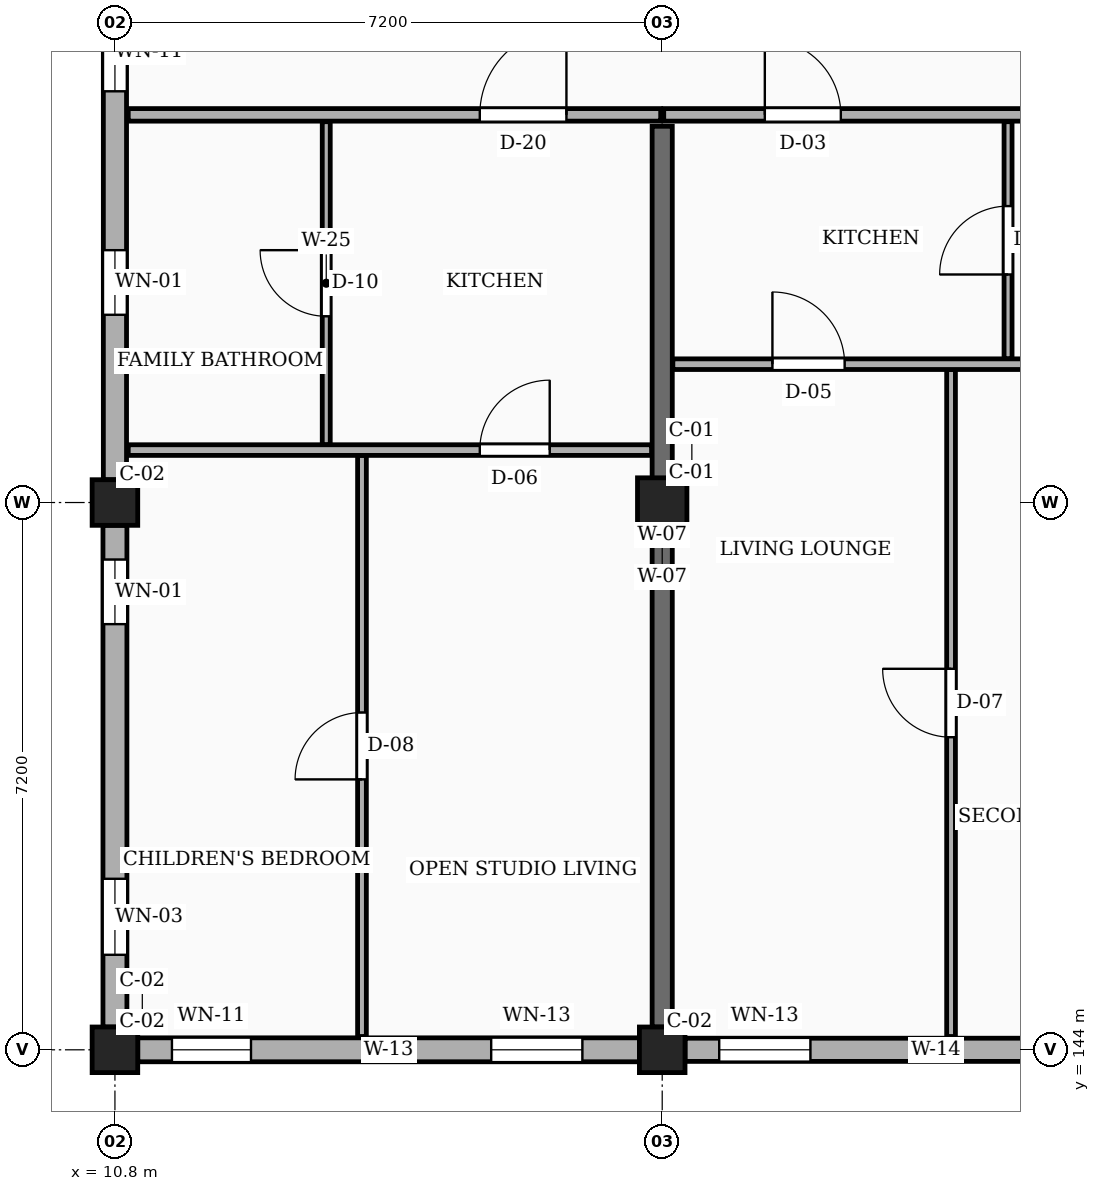
"""IFC4 building model, lengths in metres.
Left out: names, types, materials, properties, quantities, classifications, styles, units other than length and angle.
Written with IfcOpenShell. Run it as: python <this file> out.ifc"""

import sys

from ifc_helpers import new_model, si_unit, direction, frame, frame_2d, origin, origin_2d, place, context, subcontext, project, spatial, rectangle, extrude, element, fill, save


model = new_model("IFC4")
c1 = context("Model", 3, precision=1e-05, world=origin(), true_north=direction((0.0, 1.0)))
c2 = subcontext(c1, "Body", "Model", "MODEL_VIEW")
j1 = project(units=[si_unit("LENGTHUNIT", "METRE"), si_unit("PLANEANGLEUNIT", "RADIAN")], contexts=[c1])
p1 = place(None, origin())
s1 = spatial("IfcSite", under=j1, at=p1, CompositionType="ELEMENT")
p2 = place(p1, origin())
s2 = spatial("IfcBuilding", under=s1, at=p2, CompositionType="ELEMENT")
p3 = place(p2, frame((0.0, 0.0, 4.5)))
s3 = spatial("IfcBuildingStorey", under=s2, at=p3, CompositionType="ELEMENT", Elevation=4.5)
for number, where, z_axis, x_axis in (
    (1, (10.8, 144.0, 0.0), (0.0, 0.0, 1.0), (1.0, 0.0, 0.0)),
    (2, (10.8, 151.2, 0.0), (0.0, 0.0, 1.0), (1.0, 0.0, 0.0)),
    (3, (18.0, 144.0, 0.0), (0.0, 0.0, 1.0), (1.0, 0.0, 0.0)),
):
    element("IfcColumn", number, at=place(p3, frame(where, z_axis=z_axis, x_axis=x_axis)), inside=s3, PredefinedType="COLUMN", context=c2, shape_type="SweptSolid", body=[
        extrude(rectangle(XDim=0.6, YDim=0.6, at=origin_2d()), origin(), (0.0, 0.0, 1.0), 3.15),
    ])
p4 = place(p3, frame((18.0, 151.2, 0.0), z_axis=(0.0, 0.0, 1.0), x_axis=(1.0, 0.0, 0.0)))
e4 = element("IfcColumn", 4, at=p4, inside=s3, PredefinedType="COLUMN", context=c2, shape_type="SweptSolid", body=[
    extrude(rectangle(XDim=0.65, YDim=0.65, at=origin_2d()), origin(), (0.0, 0.0, 1.0), 3.15),
])
p5 = place(p3, frame((18.0, 144.3, 0.0), z_axis=(0.0, 0.0, 1.0), x_axis=(0.0, 1.0, 0.0)))
e5 = element("IfcWall", 5, at=p5, inside=s3, PredefinedType="SOLIDWALL", context=c2, shape_type="SweptSolid", body=[
    extrude(rectangle(XDim=11.85, YDim=0.265, at=frame_2d((5.925, 0.0))), origin(), (0.0, 0.0, 1.0), 2.185),
])
p6 = place(p3, frame((11.1, 144.0, 0.0), z_axis=(0.0, 0.0, 1.0), x_axis=(1.0, 0.0, 0.0)))
e6 = element("IfcWall", 6, at=p6, inside=s3, PredefinedType="SOLIDWALL", context=c2, shape_type="SweptSolid", body=[
    extrude(rectangle(XDim=6.6, YDim=0.315, at=frame_2d((3.3, 0.0))), origin(), (0.0, 0.0, 1.0), 2.455),
])
p7 = place(p6, frame((0.45, 0.0, 0.78)))
e7 = element("IfcOpeningElement", 7, at=p7, cuts=e6, PredefinedType="OPENING", context=c2, shape_type="SweptSolid", body=[
    extrude(rectangle(XDim=1.04, YDim=1.26, at=frame_2d((0.52, 0.63))), frame((0.0, 0.167, 0.0), z_axis=(0.0, -1.0, 0.0), x_axis=(1.0, 0.0, 0.0)), (0.0, 0.0, 1.0), 0.335),
])
p8 = place(p6, frame((4.65, 0.0, 0.78)))
e8 = element("IfcOpeningElement", 8, at=p8, cuts=e6, PredefinedType="OPENING", context=c2, shape_type="SweptSolid", body=[
    extrude(rectangle(XDim=1.2, YDim=1.26, at=frame_2d((0.6, 0.63))), frame((0.0, 0.167, 0.0), z_axis=(0.0, -1.0, 0.0), x_axis=(1.0, 0.0, 0.0)), (0.0, 0.0, 1.0), 0.335),
])
p9 = place(p3, frame((18.3, 144.0, 0.0), z_axis=(0.0, 0.0, 1.0), x_axis=(1.0, 0.0, 0.0)))
e9 = element("IfcWall", 9, at=p9, inside=s3, PredefinedType="SOLIDWALL", context=c2, shape_type="SweptSolid", body=[
    extrude(rectangle(XDim=6.6, YDim=0.305, at=frame_2d((3.3, 0.0))), origin(), (0.0, 0.0, 1.0), 2.455),
])
p10 = place(p9, frame((0.45, 0.0, 0.78)))
e10 = element("IfcOpeningElement", 10, at=p10, cuts=e9, PredefinedType="OPENING", context=c2, shape_type="SweptSolid", body=[
    extrude(rectangle(XDim=1.2, YDim=1.26, at=frame_2d((0.6, 0.63))), frame((0.0, 0.163, 0.0), z_axis=(0.0, -1.0, 0.0), x_axis=(1.0, 0.0, 0.0)), (0.0, 0.0, 1.0), 0.325),
])
p11 = place(p9, frame((4.65, 0.0, 0.78)))
e11 = element("IfcOpeningElement", 11, at=p11, cuts=e9, PredefinedType="OPENING", context=c2, shape_type="SweptSolid", body=[
    extrude(rectangle(XDim=1.36, YDim=1.26, at=frame_2d((0.68, 0.63))), frame((0.0, 0.163, 0.0), z_axis=(0.0, -1.0, 0.0), x_axis=(1.0, 0.0, 0.0)), (0.0, 0.0, 1.0), 0.325),
])
p12 = place(p3, frame((10.8, 158.1, 0.0), z_axis=(0.0, 0.0, 1.0), x_axis=(0.0, -1.0, 0.0)))
e12 = element("IfcWall", 12, at=p12, inside=s3, PredefinedType="SOLIDWALL", context=c2, shape_type="SweptSolid", body=[
    extrude(rectangle(XDim=6.6, YDim=0.305, at=frame_2d((3.3, 0.0))), origin(), (0.0, 0.0, 1.0), 2.455),
])
p13 = place(p12, frame((0.45, 0.0, 0.78)))
e13 = element("IfcOpeningElement", 13, at=p13, cuts=e12, PredefinedType="OPENING", context=c2, shape_type="SweptSolid", body=[
    extrude(rectangle(XDim=1.04, YDim=1.26, at=frame_2d((0.52, 0.63))), frame((0.0, 0.163, 0.0), z_axis=(0.0, -1.0, 0.0), x_axis=(1.0, 0.0, 0.0)), (0.0, 0.0, 1.0), 0.325),
])
p14 = place(p12, frame((3.58, 0.0, 0.78)))
e14 = element("IfcOpeningElement", 14, at=p14, cuts=e12, PredefinedType="OPENING", context=c2, shape_type="SweptSolid", body=[
    extrude(rectangle(XDim=0.85, YDim=1.15, at=frame_2d((0.425, 0.575))), frame((0.0, 0.163, 0.0), z_axis=(0.0, -1.0, 0.0), x_axis=(1.0, 0.0, 0.0)), (0.0, 0.0, 1.0), 0.325),
])
p15 = place(p3, frame((10.8, 150.9, 0.0), z_axis=(0.0, 0.0, 1.0), x_axis=(0.0, -1.0, 0.0)))
e15 = element("IfcWall", 15, at=p15, inside=s3, PredefinedType="SOLIDWALL", context=c2, shape_type="SweptSolid", body=[
    extrude(rectangle(XDim=6.6, YDim=0.315, at=frame_2d((3.3, 0.0))), origin(), (0.0, 0.0, 1.0), 2.455),
])
p16 = place(p15, frame((0.45, 0.0, 0.78)))
e16 = element("IfcOpeningElement", 16, at=p16, cuts=e15, PredefinedType="OPENING", context=c2, shape_type="SweptSolid", body=[
    extrude(rectangle(XDim=0.85, YDim=1.15, at=frame_2d((0.425, 0.575))), frame((0.0, 0.167, 0.0), z_axis=(0.0, -1.0, 0.0), x_axis=(1.0, 0.0, 0.0)), (0.0, 0.0, 1.0), 0.335),
])
p17 = place(p15, frame((4.65, 0.0, 0.78)))
e17 = element("IfcOpeningElement", 17, at=p17, cuts=e15, PredefinedType="OPENING", context=c2, shape_type="SweptSolid", body=[
    extrude(rectangle(XDim=1.0, YDim=1.15, at=frame_2d((0.5, 0.575))), frame((0.0, 0.167, 0.0), z_axis=(0.0, -1.0, 0.0), x_axis=(1.0, 0.0, 0.0)), (0.0, 0.0, 1.0), 0.335),
])
p18 = place(p3, frame((10.975, 156.3, 0.0), z_axis=(0.0, 0.0, 1.0), x_axis=(1.0, 0.0, 0.0)))
e18 = element("IfcWall", 18, at=p18, inside=s3, PredefinedType="PARTITIONING", context=c2, shape_type="SweptSolid", body=[
    extrude(rectangle(XDim=7.005, YDim=0.165, at=frame_2d((3.502, 0.0))), origin(), (0.0, 0.0, 1.0), 2.32),
])
p19 = place(p18, frame((4.625, 0.0, 0.0)))
e19 = element("IfcOpeningElement", 19, at=p19, cuts=e18, PredefinedType="OPENING", context=c2, shape_type="SweptSolid", body=[
    extrude(rectangle(XDim=1.14, YDim=2.18, at=frame_2d((0.57, 1.09))), frame((0.0, 0.093, 0.0), z_axis=(0.0, -1.0, 0.0), x_axis=(1.0, 0.0, 0.0)), (0.0, 0.0, 1.0), 0.185),
])
p20 = place(p3, frame((18.02, 156.3, 0.0), z_axis=(0.0, 0.0, 1.0), x_axis=(1.0, 0.0, 0.0)))
e20 = element("IfcWall", 20, at=p20, inside=s3, PredefinedType="PARTITIONING", context=c2, shape_type="SweptSolid", body=[
    extrude(rectangle(XDim=7.16, YDim=0.165, at=frame_2d((3.58, 0.0))), origin(), (0.0, 0.0, 1.0), 2.32),
])
p21 = place(p20, frame((1.33, 0.0, 0.0)))
e21 = element("IfcOpeningElement", 21, at=p21, cuts=e20, PredefinedType="OPENING", context=c2, shape_type="SweptSolid", body=[
    extrude(rectangle(XDim=1.0, YDim=2.15, at=frame_2d((0.5, 1.075))), frame((0.0, 0.093, 0.0), z_axis=(0.0, -1.0, 0.0), x_axis=(1.0, 0.0, 0.0)), (0.0, 0.0, 1.0), 0.185),
])
p22 = place(p3, frame((14.05, 144.175, 0.0), z_axis=(0.0, 0.0, 1.0), x_axis=(0.0, 1.0, 0.0)))
e22 = element("IfcWall", 22, at=p22, inside=s3, PredefinedType="PARTITIONING", context=c2, shape_type="SweptSolid", body=[
    extrude(rectangle(XDim=7.645, YDim=0.115, at=frame_2d((3.823, 0.0))), origin(), (0.0, 0.0, 1.0), 2.32),
])
p23 = place(p22, frame((3.383, 0.0, 0.0)))
e23 = element("IfcOpeningElement", 23, at=p23, cuts=e22, PredefinedType="OPENING", context=c2, shape_type="SweptSolid", body=[
    extrude(rectangle(XDim=0.88, YDim=2.08, at=frame_2d((0.44, 1.04))), frame((0.0, 0.067, 0.0), z_axis=(0.0, -1.0, 0.0), x_axis=(1.0, 0.0, 0.0)), (0.0, 0.0, 1.0), 0.135),
])
p24 = place(p3, frame((13.58, 151.96, 0.0), z_axis=(0.0, 0.0, 1.0), x_axis=(0.0, 1.0, 0.0)))
e24 = element("IfcWall", 24, at=p24, inside=s3, PredefinedType="PARTITIONING", context=c2, shape_type="SweptSolid", body=[
    extrude(rectangle(XDim=4.25, YDim=0.105, at=frame_2d((2.125, 0.0))), origin(), (0.0, 0.0, 1.0), 2.32),
])
p25 = place(p24, frame((1.69, 0.0, 0.0)))
e25 = element("IfcOpeningElement", 25, at=p25, cuts=e24, PredefinedType="OPENING", context=c2, shape_type="SweptSolid", body=[
    extrude(rectangle(XDim=0.87, YDim=2.05, at=frame_2d((0.435, 1.025))), frame((0.0, 0.062, 0.0), z_axis=(0.0, -1.0, 0.0), x_axis=(1.0, 0.0, 0.0)), (0.0, 0.0, 1.0), 0.125),
])
p26 = place(p3, frame((10.975, 151.89, 0.0), z_axis=(0.0, 0.0, 1.0), x_axis=(1.0, 0.0, 0.0)))
e26 = element("IfcWall", 26, at=p26, inside=s3, PredefinedType="PARTITIONING", context=c2, shape_type="SweptSolid", body=[
    extrude(rectangle(XDim=6.885, YDim=0.14, at=frame_2d((3.442, 0.0))), origin(), (0.0, 0.0, 1.0), 2.32),
])
p27 = place(p26, frame((4.625, 0.0, 0.0)))
e27 = element("IfcOpeningElement", 27, at=p27, cuts=e26, PredefinedType="OPENING", context=c2, shape_type="SweptSolid", body=[
    extrude(rectangle(XDim=0.92, YDim=2.1, at=frame_2d((0.46, 1.05))), frame((0.0, 0.08, 0.0), z_axis=(0.0, -1.0, 0.0), x_axis=(1.0, 0.0, 0.0)), (0.0, 0.0, 1.0), 0.16),
])
p28 = place(p3, frame((21.8, 144.175, 0.0), z_axis=(0.0, 0.0, 1.0), x_axis=(0.0, 1.0, 0.0)))
e28 = element("IfcWall", 28, at=p28, inside=s3, PredefinedType="PARTITIONING", context=c2, shape_type="SweptSolid", body=[
    extrude(rectangle(XDim=8.775, YDim=0.115, at=frame_2d((4.387, 0.0))), origin(), (0.0, 0.0, 1.0), 2.32),
])
p29 = place(p28, frame((3.938, 0.0, 0.0)))
e29 = element("IfcOpeningElement", 29, at=p29, cuts=e28, PredefinedType="OPENING", context=c2, shape_type="SweptSolid", body=[
    extrude(rectangle(XDim=0.9, YDim=2.1, at=frame_2d((0.45, 1.05))), frame((0.0, 0.067, 0.0), z_axis=(0.0, -1.0, 0.0), x_axis=(1.0, 0.0, 0.0)), (0.0, 0.0, 1.0), 0.135),
])
p30 = place(p3, frame((22.55, 153.09, 0.0), z_axis=(0.0, 0.0, 1.0), x_axis=(0.0, 1.0, 0.0)))
e30 = element("IfcWall", 30, at=p30, inside=s3, PredefinedType="PARTITIONING", context=c2, shape_type="SweptSolid", body=[
    extrude(rectangle(XDim=3.12, YDim=0.105, at=frame_2d((1.56, 0.0))), origin(), (0.0, 0.0, 1.0), 2.32),
])
p31 = place(p30, frame((1.11, 0.0, 0.0)))
e31 = element("IfcOpeningElement", 31, at=p31, cuts=e30, PredefinedType="OPENING", context=c2, shape_type="SweptSolid", body=[
    extrude(rectangle(XDim=0.9, YDim=2.05, at=frame_2d((0.45, 1.025))), frame((0.0, 0.062, 0.0), z_axis=(0.0, -1.0, 0.0), x_axis=(1.0, 0.0, 0.0)), (0.0, 0.0, 1.0), 0.125),
])
p32 = place(p3, frame((18.14, 153.02, 0.0), z_axis=(0.0, 0.0, 1.0), x_axis=(1.0, 0.0, 0.0)))
e32 = element("IfcWall", 32, at=p32, inside=s3, PredefinedType="PARTITIONING", context=c2, shape_type="SweptSolid", body=[
    extrude(rectangle(XDim=6.92, YDim=0.14, at=frame_2d((3.46, 0.0))), origin(), (0.0, 0.0, 1.0), 2.32),
])
p33 = place(p32, frame((1.31, 0.0, 0.0)))
e33 = element("IfcOpeningElement", 33, at=p33, cuts=e32, PredefinedType="OPENING", context=c2, shape_type="SweptSolid", body=[
    extrude(rectangle(XDim=0.95, YDim=2.1, at=frame_2d((0.475, 1.05))), frame((0.0, 0.08, 0.0), z_axis=(0.0, -1.0, 0.0), x_axis=(1.0, 0.0, 0.0)), (0.0, 0.0, 1.0), 0.16),
])
p34 = place(p7, origin())
e34 = element("IfcWindow", 34, at=p34, inside=s3, PartitioningType="SINGLE_PANEL", PredefinedType="WINDOW", context=c2, shape_type="SweptSolid", body=[
    extrude(rectangle(XDim=1.04, YDim=1.26, at=frame_2d((0.52, 0.63))), frame((0.0, 0.03, 0.0), z_axis=(0.0, -1.0, 0.0), x_axis=(1.0, 0.0, 0.0)), (0.0, 0.0, 1.0), 0.06),
])
fill(e7, e34)
p35 = place(p8, origin())
e35 = element("IfcWindow", 35, at=p35, inside=s3, PartitioningType="SINGLE_PANEL", PredefinedType="WINDOW", context=c2, shape_type="SweptSolid", body=[
    extrude(rectangle(XDim=1.2, YDim=1.26, at=frame_2d((0.6, 0.63))), frame((0.0, 0.03, 0.0), z_axis=(0.0, -1.0, 0.0), x_axis=(1.0, 0.0, 0.0)), (0.0, 0.0, 1.0), 0.06),
])
fill(e8, e35)
p36 = place(p10, origin())
e36 = element("IfcWindow", 36, at=p36, inside=s3, PartitioningType="SINGLE_PANEL", PredefinedType="WINDOW", context=c2, shape_type="SweptSolid", body=[
    extrude(rectangle(XDim=1.2, YDim=1.26, at=frame_2d((0.6, 0.63))), frame((0.0, 0.03, 0.0), z_axis=(0.0, -1.0, 0.0), x_axis=(1.0, 0.0, 0.0)), (0.0, 0.0, 1.0), 0.06),
])
fill(e10, e36)
p37 = place(p13, origin())
e37 = element("IfcWindow", 37, at=p37, inside=s3, PartitioningType="SINGLE_PANEL", PredefinedType="WINDOW", context=c2, shape_type="SweptSolid", body=[
    extrude(rectangle(XDim=1.04, YDim=1.26, at=frame_2d((0.52, 0.63))), frame((0.0, 0.03, 0.0), z_axis=(0.0, -1.0, 0.0), x_axis=(1.0, 0.0, 0.0)), (0.0, 0.0, 1.0), 0.06),
])
fill(e13, e37)
p38 = place(p14, origin())
e38 = element("IfcWindow", 38, at=p38, inside=s3, PartitioningType="SINGLE_PANEL", PredefinedType="WINDOW", context=c2, shape_type="SweptSolid", body=[
    extrude(rectangle(XDim=0.85, YDim=1.15, at=frame_2d((0.425, 0.575))), frame((0.0, 0.03, 0.0), z_axis=(0.0, -1.0, 0.0), x_axis=(1.0, 0.0, 0.0)), (0.0, 0.0, 1.0), 0.06),
])
fill(e14, e38)
p39 = place(p16, origin())
e39 = element("IfcWindow", 39, at=p39, inside=s3, PartitioningType="SINGLE_PANEL", PredefinedType="WINDOW", context=c2, shape_type="SweptSolid", body=[
    extrude(rectangle(XDim=0.85, YDim=1.15, at=frame_2d((0.425, 0.575))), frame((0.0, 0.03, 0.0), z_axis=(0.0, -1.0, 0.0), x_axis=(1.0, 0.0, 0.0)), (0.0, 0.0, 1.0), 0.06),
])
fill(e16, e39)
p40 = place(p17, origin())
e40 = element("IfcWindow", 40, at=p40, inside=s3, PartitioningType="SINGLE_PANEL", PredefinedType="WINDOW", context=c2, shape_type="SweptSolid", body=[
    extrude(rectangle(XDim=1.0, YDim=1.15, at=frame_2d((0.5, 0.575))), frame((0.0, 0.03, 0.0), z_axis=(0.0, -1.0, 0.0), x_axis=(1.0, 0.0, 0.0)), (0.0, 0.0, 1.0), 0.06),
])
fill(e17, e40)
p41 = place(p19, origin())
e41 = element("IfcDoor", 41, at=p41, inside=s3, OperationType="SINGLE_SWING_RIGHT", PredefinedType="DOOR", context=c2, shape_type="SweptSolid", body=[
    extrude(rectangle(XDim=1.14, YDim=2.18, at=frame_2d((0.57, 1.09))), frame((0.0, 0.025, 0.0), z_axis=(0.0, -1.0, 0.0), x_axis=(1.0, 0.0, 0.0)), (0.0, 0.0, 1.0), 0.05),
])
fill(e19, e41)
p42 = place(p21, origin())
e42 = element("IfcDoor", 42, at=p42, inside=s3, OperationType="SINGLE_SWING_LEFT", PredefinedType="DOOR", context=c2, shape_type="SweptSolid", body=[
    extrude(rectangle(XDim=1.0, YDim=2.15, at=frame_2d((0.5, 1.075))), frame((0.0, 0.025, 0.0), z_axis=(0.0, -1.0, 0.0), x_axis=(1.0, 0.0, 0.0)), (0.0, 0.0, 1.0), 0.05),
])
fill(e21, e42)
p43 = place(p23, origin())
e43 = element("IfcDoor", 43, at=p43, inside=s3, OperationType="SINGLE_SWING_LEFT", PredefinedType="DOOR", context=c2, shape_type="SweptSolid", body=[
    extrude(rectangle(XDim=0.88, YDim=2.08, at=frame_2d((0.44, 1.04))), frame((0.0, 0.025, 0.0), z_axis=(0.0, -1.0, 0.0), x_axis=(1.0, 0.0, 0.0)), (0.0, 0.0, 1.0), 0.05),
])
fill(e23, e43)
p44 = place(p25, origin())
e44 = element("IfcDoor", 44, at=p44, inside=s3, OperationType="SINGLE_SWING_RIGHT", PredefinedType="DOOR", context=c2, shape_type="SweptSolid", body=[
    extrude(rectangle(XDim=0.87, YDim=2.05, at=frame_2d((0.435, 1.025))), frame((0.0, 0.025, 0.0), z_axis=(0.0, -1.0, 0.0), x_axis=(1.0, 0.0, 0.0)), (0.0, 0.0, 1.0), 0.05),
])
fill(e25, e44)
p45 = place(p27, origin())
e45 = element("IfcDoor", 45, at=p45, inside=s3, OperationType="SINGLE_SWING_RIGHT", PredefinedType="DOOR", context=c2, shape_type="SweptSolid", body=[
    extrude(rectangle(XDim=0.92, YDim=2.1, at=frame_2d((0.46, 1.05))), frame((0.0, 0.025, 0.0), z_axis=(0.0, -1.0, 0.0), x_axis=(1.0, 0.0, 0.0)), (0.0, 0.0, 1.0), 0.05),
])
fill(e27, e45)
p46 = place(p29, origin())
e46 = element("IfcDoor", 46, at=p46, inside=s3, OperationType="SINGLE_SWING_RIGHT", PredefinedType="DOOR", context=c2, shape_type="SweptSolid", body=[
    extrude(rectangle(XDim=0.9, YDim=2.1, at=frame_2d((0.45, 1.05))), frame((0.0, 0.025, 0.0), z_axis=(0.0, -1.0, 0.0), x_axis=(1.0, 0.0, 0.0)), (0.0, 0.0, 1.0), 0.05),
])
fill(e29, e46)
p47 = place(p31, origin())
e47 = element("IfcDoor", 47, at=p47, inside=s3, OperationType="SINGLE_SWING_LEFT", PredefinedType="DOOR", context=c2, shape_type="SweptSolid", body=[
    extrude(rectangle(XDim=0.9, YDim=2.05, at=frame_2d((0.45, 1.025))), frame((0.0, 0.025, 0.0), z_axis=(0.0, -1.0, 0.0), x_axis=(1.0, 0.0, 0.0)), (0.0, 0.0, 1.0), 0.05),
])
fill(e31, e47)
p48 = place(p33, origin())
e48 = element("IfcDoor", 48, at=p48, inside=s3, OperationType="SINGLE_SWING_LEFT", PredefinedType="DOOR", context=c2, shape_type="SweptSolid", body=[
    extrude(rectangle(XDim=0.95, YDim=2.1, at=frame_2d((0.475, 1.05))), frame((0.0, 0.025, 0.0), z_axis=(0.0, -1.0, 0.0), x_axis=(1.0, 0.0, 0.0)), (0.0, 0.0, 1.0), 0.05),
])
fill(e33, e48)
save(model, sys.argv[1])
